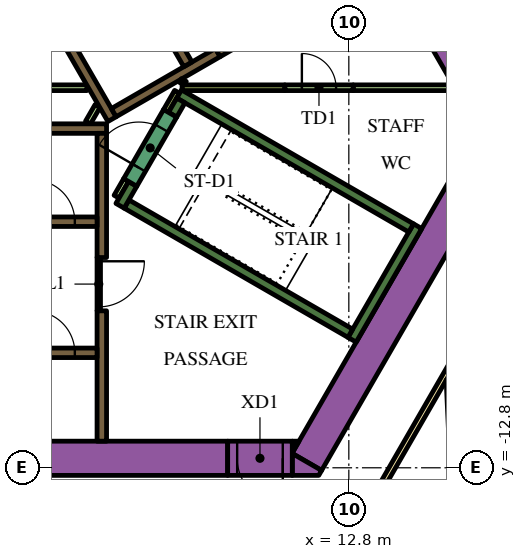
"""IFC4 building model, lengths in metres.
Left out: names, types, materials, properties, quantities, classifications, styles, units other than length and angle.
Written with IfcOpenShell. Run it as: python <this file> out.ifc"""

import sys

from ifc_helpers import new_model, si_unit, direction, frame, frame_2d, origin, place, context, subcontext, project, spatial, polyline, rectangle, outline, extrude, element, fill, save


model = new_model("IFC4")
c1 = context("Model", 3, precision=1e-05, world=origin(), true_north=direction((0.0, 1.0)))
c2 = subcontext(c1, "Body", "Model", "MODEL_VIEW")
j1 = project(units=[si_unit("LENGTHUNIT", "METRE"), si_unit("PLANEANGLEUNIT", "RADIAN")], contexts=[c1])
p1 = place(None, origin())
s1 = spatial("IfcSite", under=j1, at=p1, CompositionType="ELEMENT")
p2 = place(p1, origin())
s2 = spatial("IfcBuilding", under=s1, at=p2, CompositionType="ELEMENT")
p3 = place(p2, frame((0.0, 0.0, 58.8)))
s3 = spatial("IfcBuildingStorey", under=s2, at=p3, CompositionType="ELEMENT", Elevation=58.8)
p4 = place(p3, frame((6.776, 13.364, 0.0), z_axis=(0.0, 0.0, 1.0), x_axis=(0.500004177138, -0.8660229921, 0.0)))
e1 = element("IfcWall", 1, at=p4, inside=s3, PredefinedType="SOLIDWALL", context=c2, shape_type="SweptSolid", body=[
    extrude(rectangle(XDim=20.204, YDim=0.9, at=frame_2d((10.102, 0.0))), origin(), (0.0, 0.0, 1.0), 3.9),
])
p5 = place(p3, frame((11.695, -12.644, 0.0), z_axis=(0.0, 0.0, 1.0), x_axis=(0.500010229568, 0.86601949766, 0.0)))
e2 = element("IfcWall", 2, at=p5, inside=s3, PredefinedType="SOLIDWALL", context=c2, shape_type="SweptSolid", body=[
    extrude(rectangle(XDim=9.326, YDim=0.9, at=frame_2d((4.663, 0.0))), origin(), (0.0, 0.0, 1.0), 3.9),
])
p6 = place(p3, origin())
e3 = element("IfcWall", 3, at=p6, inside=s3, PredefinedType="SOLIDWALL", context=c2, shape_type="SweptSolid", body=[
    extrude(outline(polyline([(12.009, -13.0), (11.312, -13.0), (11.312, -12.425), (12.083, -12.871), (12.009, -13.0)])), origin(), (0.0, 0.0, 1.0), 3.9),
])
e4 = element("IfcWall", 4, at=p6, inside=s3, PredefinedType="SOLIDWALL", context=c2, shape_type="SweptSolid", body=[
    extrude(outline(polyline([(11.489, -12.1), (11.312, -12.407), (11.312, -12.1), (11.489, -12.1)])), origin(), (0.0, 0.0, 1.0), 3.9),
])
p7 = place(p3, frame((-12.019, -12.55, 0.0), z_axis=(0.0, 0.0, 1.0), x_axis=(1.0, 0.0, 0.0)))
e5 = element("IfcWall", 5, at=p7, inside=s3, PredefinedType="SOLIDWALL", context=c2, shape_type="SweptSolid", body=[
    extrude(rectangle(XDim=21.63, YDim=0.9, at=frame_2d((10.815, 0.0))), origin(), (0.0, 0.0, 1.0), 3.9),
])
p8 = place(p3, frame((12.885, -9.431, 0.0), z_axis=(0.0, 0.0, 1.0), x_axis=(0.500020560727, 0.866013532718, 0.0)))
e6 = element("IfcWall", 6, at=p8, inside=s3, PredefinedType="SOLIDWALL", context=c2, shape_type="SweptSolid", body=[
    extrude(rectangle(XDim=3.45, YDim=0.25, at=frame_2d((1.725, 0.0))), origin(), (0.0, 0.0, 1.0), 3.9),
])
p9 = place(p3, frame((12.84, -9.261, 0.0), z_axis=(0.0, 0.0, 1.0), x_axis=(-0.866013990052, 0.500019768644, 0.0)))
e7 = element("IfcWall", 7, at=p9, inside=s3, PredefinedType="SOLIDWALL", context=c2, shape_type="SweptSolid", body=[
    extrude(rectangle(XDim=6.8, YDim=0.25, at=frame_2d((3.4, 0.0))), origin(), (0.0, 0.0, 1.0), 3.9),
])
p10 = place(p3, frame((7.113, -5.33, 0.0), z_axis=(0.0, 0.0, 1.0), x_axis=(-0.499965889992, -0.866045096311, 0.0)))
e8 = element("IfcWall", 8, at=p10, inside=s3, PredefinedType="SOLIDWALL", context=c2, shape_type="SweptSolid", body=[
    extrude(rectangle(XDim=0.666, YDim=0.25, at=frame_2d((0.333, 0.0))), origin(), (0.0, 0.0, 1.0), 3.9),
])
p11 = place(p3, frame((8.334, -2.964, 0.0), z_axis=(0.0, 0.0, 1.0), x_axis=(0.866016039709, -0.500016218704, 0.0)))
e9 = element("IfcWall", 9, at=p11, inside=s3, PredefinedType="SOLIDWALL", context=c2, shape_type="SweptSolid", body=[
    extrude(rectangle(XDim=7.05, YDim=0.25, at=frame_2d((3.525, 0.0))), origin(), (0.0, 0.0, 1.0), 3.9),
])
p12 = place(p3, frame((8.163, -3.511, 0.0), z_axis=(0.0, 0.0, 1.0), x_axis=(0.500127794843, 0.865951608824, 0.0)))
e10 = element("IfcWall", 10, at=p12, inside=s3, PredefinedType="SOLIDWALL", context=c2, shape_type="SweptSolid", body=[
    extrude(rectangle(XDim=0.435, YDim=0.25, at=frame_2d((0.217, 0.0))), origin(), (0.0, 0.0, 1.0), 3.9),
])
p13 = place(p3, frame((-6.19, -3.875, 0.0), z_axis=(0.0, 0.0, 1.0), x_axis=(1.0, 0.0, 0.0)))
e11 = element("IfcWall", 11, at=p13, inside=s3, PredefinedType="SOLIDWALL", context=c2, shape_type="SweptSolid", body=[
    extrude(rectangle(XDim=12.615, YDim=0.25, at=frame_2d((6.307, 0.0))), origin(), (0.0, 0.0, 1.0), 3.9),
])
p14 = place(p3, frame((6.3, -8.67, 0.0), z_axis=(0.0, 0.0, 1.0), x_axis=(0.0, -1.0, 0.0)))
e12 = element("IfcWall", 12, at=p14, inside=s3, PredefinedType="SOLIDWALL", context=c2, shape_type="SweptSolid", body=[
    extrude(rectangle(XDim=3.43, YDim=0.25, at=frame_2d((1.715, 0.0))), origin(), (0.0, 0.0, 1.0), 3.9),
])
p15 = place(p3, frame((6.3, -7.268, 0.0), z_axis=(0.0, 0.0, 1.0), x_axis=(0.0, 1.0, 0.0)))
e13 = element("IfcWall", 13, at=p15, inside=s3, PredefinedType="SOLIDWALL", context=c2, shape_type="SweptSolid", body=[
    extrude(rectangle(XDim=3.268, YDim=0.25, at=frame_2d((1.634, 0.0))), origin(), (0.0, 0.0, 1.0), 3.9),
])
e14 = element("IfcWall", 14, at=p6, inside=s3, PredefinedType="SOLIDWALL", context=c2, shape_type="SweptSolid", body=[
    extrude(outline(polyline([(0.335, 6.925), (0.335, 6.925), (0.335, 7.075), (0.335, 7.075), (0.335, 7.075), (0.245, 7.075), (0.079, 7.363), (0.035, 7.439), (0.252, 7.564), (0.377, 7.348), (6.552, -3.348), (6.677, -3.564), (6.46, -3.689), (4.897, -0.981), (0.332, 6.925), (0.335, 6.925), (0.335, 6.925)])), origin(), (0.0, 0.0, 1.0), 3.9),
])
p16 = place(p3, frame((9.352, -1.875, 0.0), z_axis=(0.0, 0.0, 1.0), x_axis=(-0.866024844342, -0.500000968981, 0.0)))
e15 = element("IfcWall", 15, at=p16, inside=s3, PredefinedType="SOLIDWALL", context=c2, shape_type="SweptSolid", body=[
    extrude(rectangle(XDim=3.162, YDim=0.25, at=frame_2d((1.581, 0.0))), origin(), (0.0, 0.0, 1.0), 3.9),
])
p17 = place(p3, frame((6.688, -5.667, 0.0), z_axis=(0.0, 0.0, 1.0), x_axis=(0.499834152157, 0.86612113491, 0.0)))
e16 = element("IfcWall", 16, at=p17, inside=s3, PredefinedType="PARTITIONING", context=c2, shape_type="SweptSolid", body=[
    extrude(rectangle(XDim=0.505, YDim=0.15, at=frame_2d((0.252, 0.0))), origin(), (0.0, 0.0, 1.0), 2.75),
])
p18 = place(p3, frame((5.936, -3.718, 0.0), z_axis=(0.0, 0.0, 1.0), x_axis=(0.499890179513, 0.866088799389, 0.0)))
e17 = element("IfcWall", 17, at=p18, inside=s3, PredefinedType="PARTITIONING", context=c2, shape_type="SweptSolid", body=[
    extrude(rectangle(XDim=0.504, YDim=0.15, at=frame_2d((0.252, 0.0))), origin(), (0.0, 0.0, 1.0), 2.75),
])
p19 = place(p3, frame((8.412, -2.8, 0.0), z_axis=(0.0, 0.0, 1.0), x_axis=(1.0, 0.0, 0.0)))
e18 = element("IfcWall", 18, at=p19, inside=s3, PredefinedType="PARTITIONING", context=c2, shape_type="SweptSolid", body=[
    extrude(rectangle(XDim=2.702, YDim=0.15, at=frame_2d((1.351, 0.0))), origin(), (0.0, 0.0, 1.0), 3.9),
])
p20 = place(p3, frame((8.459, -2.599, 0.0), z_axis=(0.0, 0.0, 1.0), x_axis=(-0.501919277433, -0.864914469148, 0.0)))
e19 = element("IfcWall", 19, at=p20, inside=s3, PredefinedType="PARTITIONING", context=c2, shape_type="SweptSolid", body=[
    extrude(rectangle(XDim=0.109, YDim=0.15, at=frame_2d((0.054, 0.0))), origin(), (0.0, 0.0, 1.0), 3.9),
])
p21 = place(p3, frame((8.281, -2.907, 0.0), z_axis=(0.0, 0.0, 1.0), x_axis=(-0.500193841991, -0.86591346013, 0.0)))
e20 = element("IfcWall", 20, at=p21, inside=s3, PredefinedType="PARTITIONING", context=c2, shape_type="SweptSolid", body=[
    extrude(rectangle(XDim=0.583, YDim=0.15, at=frame_2d((0.292, 0.0))), origin(), (0.0, 0.0, 1.0), 3.9),
])
p22 = place(p3, frame((3.238, -2.8, 0.0), z_axis=(0.0, 0.0, 1.0), x_axis=(1.0, 0.0, 0.0)))
e21 = element("IfcWall", 21, at=p22, inside=s3, PredefinedType="PARTITIONING", context=c2, shape_type="SweptSolid", body=[
    extrude(rectangle(XDim=2.672, YDim=0.15, at=frame_2d((1.336, 0.0))), origin(), (0.0, 0.0, 1.0), 2.75),
])
p23 = place(p3, frame((12.915, -2.8, 0.0), z_axis=(0.0, 0.0, 1.0), x_axis=(1.0, 0.0, 0.0)))
e22 = element("IfcWall", 22, at=p23, inside=s3, PredefinedType="PARTITIONING", context=c2, shape_type="SweptSolid", body=[
    extrude(rectangle(XDim=2.637, YDim=0.15, at=frame_2d((1.318, 0.0))), origin(), (0.0, 0.0, 1.0), 2.75),
])
p24 = place(p3, frame((-6.175, -9.775, 0.0), z_axis=(0.0, 0.0, 1.0), x_axis=(1.0, 0.0, 0.0)))
e23 = element("IfcWall", 23, at=p24, inside=s3, PredefinedType="SOLIDWALL", context=c2, shape_type="SweptSolid", body=[
    extrude(rectangle(XDim=12.35, YDim=0.25, at=frame_2d((6.175, 0.0))), origin(), (0.0, 0.0, 1.0), 3.9),
])
p25 = place(p24, frame((0.585, 0.0, 0.0)))
e24 = element("IfcOpeningElement", 24, at=p25, cuts=e23, PredefinedType="OPENING", context=c2, shape_type="SweptSolid", body=[
    extrude(rectangle(XDim=1.1, YDim=2.1, at=frame_2d((0.55, 1.05))), frame((0.0, 0.135, 0.0), z_axis=(0.0, -1.0, 0.0), x_axis=(1.0, 0.0, 0.0)), (0.0, 0.0, 1.0), 0.27),
])
p26 = place(p24, frame((3.105, 0.0, 0.0)))
e25 = element("IfcOpeningElement", 25, at=p26, cuts=e23, PredefinedType="OPENING", context=c2, shape_type="SweptSolid", body=[
    extrude(rectangle(XDim=1.1, YDim=2.1, at=frame_2d((0.55, 1.05))), frame((0.0, 0.135, 0.0), z_axis=(0.0, -1.0, 0.0), x_axis=(1.0, 0.0, 0.0)), (0.0, 0.0, 1.0), 0.27),
])
p27 = place(p24, frame((5.625, 0.0, 0.0)))
e26 = element("IfcOpeningElement", 26, at=p27, cuts=e23, PredefinedType="OPENING", context=c2, shape_type="SweptSolid", body=[
    extrude(rectangle(XDim=1.1, YDim=2.1, at=frame_2d((0.55, 1.05))), frame((0.0, 0.135, 0.0), z_axis=(0.0, -1.0, 0.0), x_axis=(1.0, 0.0, 0.0)), (0.0, 0.0, 1.0), 0.27),
])
p28 = place(p24, frame((8.145, 0.0, 0.0)))
e27 = element("IfcOpeningElement", 27, at=p28, cuts=e23, PredefinedType="OPENING", context=c2, shape_type="SweptSolid", body=[
    extrude(rectangle(XDim=1.1, YDim=2.1, at=frame_2d((0.55, 1.05))), frame((0.0, 0.135, 0.0), z_axis=(0.0, -1.0, 0.0), x_axis=(1.0, 0.0, 0.0)), (0.0, 0.0, 1.0), 0.27),
])
p29 = place(p24, frame((10.665, 0.0, 0.0)))
e28 = element("IfcOpeningElement", 28, at=p29, cuts=e23, PredefinedType="OPENING", context=c2, shape_type="SweptSolid", body=[
    extrude(rectangle(XDim=1.1, YDim=2.1, at=frame_2d((0.55, 1.05))), frame((0.0, 0.135, 0.0), z_axis=(0.0, -1.0, 0.0), x_axis=(1.0, 0.0, 0.0)), (0.0, 0.0, 1.0), 0.27),
])
p30 = place(p3, frame((-6.175, -6.325, 0.0), z_axis=(0.0, 0.0, 1.0), x_axis=(1.0, 0.0, 0.0)))
e29 = element("IfcWall", 29, at=p30, inside=s3, PredefinedType="SOLIDWALL", context=c2, shape_type="SweptSolid", body=[
    extrude(rectangle(XDim=12.35, YDim=0.25, at=frame_2d((6.175, 0.0))), origin(), (0.0, 0.0, 1.0), 3.9),
])
p31 = place(p30, frame((3.205, 0.0, 0.0)))
e30 = element("IfcOpeningElement", 30, at=p31, cuts=e29, PredefinedType="OPENING", context=c2, shape_type="SweptSolid", body=[
    extrude(rectangle(XDim=0.9, YDim=2.1, at=frame_2d((0.45, 1.05))), frame((0.0, 0.135, 0.0), z_axis=(0.0, -1.0, 0.0), x_axis=(1.0, 0.0, 0.0)), (0.0, 0.0, 1.0), 0.27),
])
p32 = place(p30, frame((8.145, 0.0, 0.0)))
e31 = element("IfcOpeningElement", 31, at=p32, cuts=e29, PredefinedType="OPENING", context=c2, shape_type="SweptSolid", body=[
    extrude(rectangle(XDim=1.1, YDim=2.1, at=frame_2d((0.55, 1.05))), frame((0.0, 0.135, 0.0), z_axis=(0.0, -1.0, 0.0), x_axis=(1.0, 0.0, 0.0)), (0.0, 0.0, 1.0), 0.27),
])
p33 = place(p30, frame((10.665, 0.0, 0.0)))
e32 = element("IfcOpeningElement", 32, at=p33, cuts=e29, PredefinedType="OPENING", context=c2, shape_type="SweptSolid", body=[
    extrude(rectangle(XDim=1.1, YDim=2.1, at=frame_2d((0.55, 1.05))), frame((0.0, 0.135, 0.0), z_axis=(0.0, -1.0, 0.0), x_axis=(1.0, 0.0, 0.0)), (0.0, 0.0, 1.0), 0.27),
])
p34 = place(p3, frame((8.565, -2.185, 0.0), z_axis=(0.0, 0.0, 1.0), x_axis=(-0.499997954832, 0.866026584559, 0.0)))
e33 = element("IfcWall", 33, at=p34, inside=s3, PredefinedType="SOLIDWALL", context=c2, shape_type="SweptSolid", body=[
    extrude(rectangle(XDim=12.35, YDim=0.25, at=frame_2d((6.175, 0.0))), origin(), (0.0, 0.0, 1.0), 3.9),
])
p35 = place(p34, frame((5.725, 0.0, 0.0)))
e34 = element("IfcOpeningElement", 34, at=p35, cuts=e33, PredefinedType="OPENING", context=c2, shape_type="SweptSolid", body=[
    extrude(rectangle(XDim=0.9, YDim=2.1, at=frame_2d((0.45, 1.05))), frame((0.0, 0.135, 0.0), z_axis=(0.0, -1.0, 0.0), x_axis=(1.0, 0.0, 0.0)), (0.0, 0.0, 1.0), 0.27),
])
p36 = place(p3, frame((7.048, -5.292, 0.0), z_axis=(0.0, 0.0, 1.0), x_axis=(0.49994051562, 0.866059744384, 0.0)))
e35 = element("IfcWall", 35, at=p36, inside=s3, PredefinedType="SOLIDWALL", context=c2, shape_type="SweptSolid", body=[
    extrude(rectangle(XDim=2.1, YDim=0.4, at=frame_2d((1.05, 0.0))), origin(), (0.0, 0.0, 1.0), 3.9),
])
p37 = place(p36, frame((0.45, 0.0, 0.0)))
e36 = element("IfcOpeningElement", 36, at=p37, cuts=e35, PredefinedType="OPENING", context=c2, shape_type="SweptSolid", body=[
    extrude(rectangle(XDim=1.2, YDim=2.1, at=frame_2d((0.6, 1.05))), frame((0.0, 0.21, 0.0), z_axis=(0.0, -1.0, 0.0), x_axis=(1.0, 0.0, 0.0)), (0.0, 0.0, 1.0), 0.42),
])
p38 = place(p3, frame((6.22, -7.266, 0.0), z_axis=(0.0, 0.0, 1.0), x_axis=(0.0, -1.0, 0.0)))
e37 = element("IfcWall", 37, at=p38, inside=s3, PredefinedType="PARTITIONING", context=c2, shape_type="SweptSolid", body=[
    extrude(rectangle(XDim=1.4, YDim=0.09, at=frame_2d((0.7, 0.0))), origin(), (0.0, 0.0, 1.0), 2.75),
])
p39 = place(p38, frame((0.1, 0.0, 0.0)))
e38 = element("IfcOpeningElement", 38, at=p39, cuts=e37, PredefinedType="OPENING", context=c2, shape_type="SweptSolid", body=[
    extrude(rectangle(XDim=1.2, YDim=2.1, at=frame_2d((0.6, 1.05))), frame((0.0, 0.055, 0.0), z_axis=(0.0, -1.0, 0.0), x_axis=(1.0, 0.0, 0.0)), (0.0, 0.0, 1.0), 0.11),
])
p40 = place(p3, frame((11.312, -12.55, 0.0), z_axis=(0.0, 0.0, 1.0), x_axis=(-1.0, 0.0, 0.0)))
e39 = element("IfcWall", 39, at=p40, inside=s3, PredefinedType="SOLIDWALL", context=c2, shape_type="SweptSolid", body=[
    extrude(rectangle(XDim=1.7, YDim=0.9, at=frame_2d((0.85, 0.0))), origin(), (0.0, 0.0, 1.0), 3.9),
])
p41 = place(p40, frame((0.25, 0.0, 0.0)))
e40 = element("IfcOpeningElement", 40, at=p41, cuts=e39, PredefinedType="OPENING", context=c2, shape_type="SweptSolid", body=[
    extrude(rectangle(XDim=1.2, YDim=2.1, at=frame_2d((0.6, 1.05))), frame((0.0, 0.46, 0.0), z_axis=(0.0, -1.0, 0.0), x_axis=(1.0, 0.0, 0.0)), (0.0, 0.0, 1.0), 0.92),
])
p42 = place(p3, frame((9.352, -1.875, 0.0), z_axis=(0.0, 0.0, 1.0), x_axis=(0.865989075817, 0.500062916607, 0.0)))
e41 = element("IfcWall", 41, at=p42, inside=s3, PredefinedType="SOLIDWALL", context=c2, shape_type="SweptSolid", body=[
    extrude(rectangle(XDim=1.8, YDim=0.25, at=frame_2d((0.9, 0.0))), origin(), (0.0, 0.0, 1.0), 3.9),
])
p43 = place(p42, frame((0.45, 0.0, 0.0)))
e42 = element("IfcOpeningElement", 42, at=p43, cuts=e41, PredefinedType="OPENING", context=c2, shape_type="SweptSolid", body=[
    extrude(rectangle(XDim=0.9, YDim=2.1, at=frame_2d((0.45, 1.05))), frame((0.0, 0.135, 0.0), z_axis=(0.0, -1.0, 0.0), x_axis=(1.0, 0.0, 0.0)), (0.0, 0.0, 1.0), 0.27),
])
p44 = place(p3, frame((11.115, -2.8, 0.0), z_axis=(0.0, 0.0, 1.0), x_axis=(1.0, 0.0, 0.0)))
e43 = element("IfcWall", 43, at=p44, inside=s3, PredefinedType="PARTITIONING", context=c2, shape_type="SweptSolid", body=[
    extrude(rectangle(XDim=1.8, YDim=0.15, at=frame_2d((0.9, 0.0))), origin(), (0.0, 0.0, 1.0), 2.75),
])
p45 = place(p44, frame((0.45, 0.0, 0.0)))
e44 = element("IfcOpeningElement", 44, at=p45, cuts=e43, PredefinedType="OPENING", context=c2, shape_type="SweptSolid", body=[
    extrude(rectangle(XDim=0.9, YDim=2.1, at=frame_2d((0.45, 1.05))), frame((0.0, 0.085, 0.0), z_axis=(0.0, -1.0, 0.0), x_axis=(1.0, 0.0, 0.0)), (0.0, 0.0, 1.0), 0.17),
])
p46 = place(p3, frame((6.163, 18.475, 0.0), z_axis=(0.0, 0.0, 1.0), x_axis=(0.500001317485, -0.866024643133, 0.0)))
e45 = element("IfcWall", 45, at=p46, inside=s3, PredefinedType="PARTITIONING", context=c2, shape_type="SweptSolid", body=[
    extrude(rectangle(XDim=25.767, YDim=0.15, at=frame_2d((12.883, 0.0))), origin(), (0.0, 0.0, 1.0), 2.75),
])
p47 = place(p46, frame((24.586, 0.0, 0.0)))
e46 = element("IfcOpeningElement", 46, at=p47, cuts=e45, PredefinedType="OPENING", context=c2, shape_type="SweptSolid", body=[
    extrude(rectangle(XDim=1.0, YDim=2.1, at=frame_2d((0.5, 1.05))), frame((0.0, 0.085, 0.0), z_axis=(0.0, -1.0, 0.0), x_axis=(1.0, 0.0, 0.0)), (0.0, 0.0, 1.0), 0.17),
])
p48 = place(p46, frame((13.144, 0.0, 0.0)))
e47 = element("IfcOpeningElement", 47, at=p48, cuts=e45, PredefinedType="OPENING", context=c2, shape_type="SweptSolid", body=[
    extrude(rectangle(XDim=1.0, YDim=2.1, at=frame_2d((0.5, 1.05))), frame((0.0, 0.085, 0.0), z_axis=(0.0, -1.0, 0.0), x_axis=(1.0, 0.0, 0.0)), (0.0, 0.0, 1.0), 0.17),
])
p49 = place(p46, frame((11.692, 0.0, 0.0)))
e48 = element("IfcOpeningElement", 48, at=p49, cuts=e45, PredefinedType="OPENING", context=c2, shape_type="SweptSolid", body=[
    extrude(rectangle(XDim=1.0, YDim=2.1, at=frame_2d((0.5, 1.05))), frame((0.0, 0.085, 0.0), z_axis=(0.0, -1.0, 0.0), x_axis=(1.0, 0.0, 0.0)), (0.0, 0.0, 1.0), 0.17),
])
p50 = place(p46, frame((0.572, 0.0, 0.0)))
e49 = element("IfcOpeningElement", 49, at=p50, cuts=e45, PredefinedType="OPENING", context=c2, shape_type="SweptSolid", body=[
    extrude(rectangle(XDim=1.0, YDim=2.1, at=frame_2d((0.5, 1.05))), frame((0.0, 0.085, 0.0), z_axis=(0.0, -1.0, 0.0), x_axis=(1.0, 0.0, 0.0)), (0.0, 0.0, 1.0), 0.17),
])
p51 = place(p3, frame((15.587, -9.952, 0.0), z_axis=(0.0, 0.0, 1.0), x_axis=(-0.500016618951, -0.866015808616, 0.0)))
e50 = element("IfcWall", 50, at=p51, inside=s3, PredefinedType="PARTITIONING", context=c2, shape_type="SweptSolid", body=[
    extrude(rectangle(XDim=5.268, YDim=0.15, at=frame_2d((2.634, 0.0))), origin(), (0.0, 0.0, 1.0), 2.75),
])
p52 = place(p3, frame((15.973, -22.109, 0.0), z_axis=(0.0, 0.0, 1.0), x_axis=(-0.046191717129, 0.998932592955, 0.0)))
e51 = element("IfcWall", 51, at=p52, inside=s3, PredefinedType="PARTITIONING", context=c2, shape_type="SweptSolid", body=[
    extrude(rectangle(XDim=11.638, YDim=0.15, at=frame_2d((5.819, 0.0))), origin(), (0.0, 0.0, 1.0), 2.75),
])
p53 = place(p29, origin())
e52 = element("IfcDoor", 52, at=p53, inside=s3, OperationType="DOUBLE_DOOR_SLIDING", PredefinedType="DOOR", context=c2, shape_type="SweptSolid", body=[
    extrude(rectangle(XDim=1.1, YDim=2.1, at=frame_2d((0.55, 1.05))), frame((0.0, 0.025, 0.0), z_axis=(0.0, -1.0, 0.0), x_axis=(1.0, 0.0, 0.0)), (0.0, 0.0, 1.0), 0.05),
])
fill(e28, e52)
p54 = place(p33, origin())
e53 = element("IfcDoor", 53, at=p54, inside=s3, OperationType="DOUBLE_DOOR_SLIDING", PredefinedType="DOOR", context=c2, shape_type="SweptSolid", body=[
    extrude(rectangle(XDim=1.1, YDim=2.1, at=frame_2d((0.55, 1.05))), frame((0.0, 0.025, 0.0), z_axis=(0.0, -1.0, 0.0), x_axis=(1.0, 0.0, 0.0)), (0.0, 0.0, 1.0), 0.05),
])
fill(e32, e53)
p55 = place(p37, origin())
e54 = element("IfcDoor", 54, at=p55, inside=s3, OperationType="SINGLE_SWING_LEFT", PredefinedType="DOOR", context=c2, shape_type="SweptSolid", body=[
    extrude(rectangle(XDim=1.2, YDim=2.1, at=frame_2d((0.6, 1.05))), frame((0.0, 0.025, 0.0), z_axis=(0.0, -1.0, 0.0), x_axis=(1.0, 0.0, 0.0)), (0.0, 0.0, 1.0), 0.05),
])
fill(e36, e54)
p56 = place(p39, origin())
e55 = element("IfcDoor", 55, at=p56, inside=s3, OperationType="SINGLE_SWING_LEFT", PredefinedType="DOOR", context=c2, shape_type="SweptSolid", body=[
    extrude(rectangle(XDim=1.2, YDim=2.1, at=frame_2d((0.6, 1.05))), frame((0.0, 0.025, 0.0), z_axis=(0.0, -1.0, 0.0), x_axis=(1.0, 0.0, 0.0)), (0.0, 0.0, 1.0), 0.05),
])
fill(e38, e55)
p57 = place(p41, origin())
e56 = element("IfcDoor", 56, at=p57, inside=s3, OperationType="SINGLE_SWING_LEFT", PredefinedType="DOOR", context=c2, shape_type="SweptSolid", body=[
    extrude(rectangle(XDim=1.2, YDim=2.1, at=frame_2d((0.6, 1.05))), frame((0.0, 0.025, 0.0), z_axis=(0.0, -1.0, 0.0), x_axis=(1.0, 0.0, 0.0)), (0.0, 0.0, 1.0), 0.05),
])
fill(e40, e56)
p58 = place(p45, origin())
e57 = element("IfcDoor", 57, at=p58, inside=s3, OperationType="SINGLE_SWING_LEFT", PredefinedType="DOOR", context=c2, shape_type="SweptSolid", body=[
    extrude(rectangle(XDim=0.9, YDim=2.1, at=frame_2d((0.45, 1.05))), frame((0.0, 0.025, 0.0), z_axis=(0.0, -1.0, 0.0), x_axis=(1.0, 0.0, 0.0)), (0.0, 0.0, 1.0), 0.05),
])
fill(e44, e57)
save(model, sys.argv[1])
